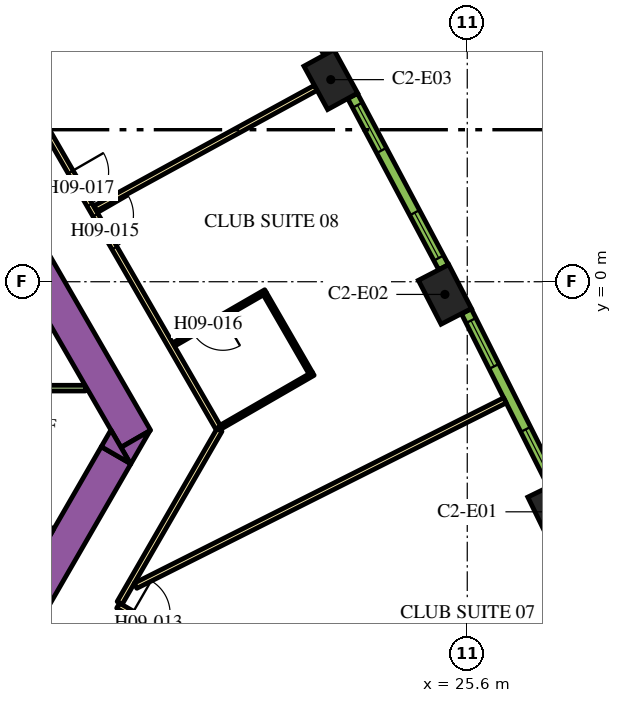
"""IFC4 building model, lengths in metres.
Left out: names, types, materials, properties, quantities, classifications, styles, units other than length and angle.
Written with IfcOpenShell. Run it as: python <this file> out.ifc"""

import sys

from ifc_helpers import new_model, si_unit, direction, frame, frame_2d, origin, origin_2d, place, context, subcontext, project, spatial, polyline, rectangle, outline, extrude, element, fill, save


model = new_model("IFC4")
c1 = context("Model", 3, precision=1e-05, world=origin(), true_north=direction((0.0, 1.0)))
c2 = subcontext(c1, "Body", "Model", "MODEL_VIEW")
j1 = project(units=[si_unit("LENGTHUNIT", "METRE"), si_unit("PLANEANGLEUNIT", "RADIAN")], contexts=[c1])
p1 = place(None, origin())
s1 = spatial("IfcSite", under=j1, at=p1, CompositionType="ELEMENT")
p2 = place(p1, origin())
s2 = spatial("IfcBuilding", under=s1, at=p2, CompositionType="ELEMENT")
p3 = place(p2, frame((0.0, 0.0, 126.6)))
s3 = spatial("IfcBuildingStorey", under=s2, at=p3, CompositionType="ELEMENT", Elevation=126.6)
for number, where, z_axis, x_axis in (
    (1, (27.883, -6.054, 0.0), (0.0, 0.0, 1.0), (-0.438, 0.899, 0.0)),
    (2, (25.012, -0.334, 0.0), (0.0, 0.0, 1.0), (-0.459, 0.888, 0.0)),
    (3, (22.009, 5.317, 0.0), (0.0, 0.0, 1.0), (-0.48, 0.877, 0.0)),
):
    element("IfcColumn", number, at=place(p3, frame(where, z_axis=z_axis, x_axis=x_axis)), inside=s3, PredefinedType="COLUMN", context=c2, shape_type="SweptSolid", body=[
        extrude(rectangle(XDim=1.3, YDim=0.9, at=origin_2d()), origin(), (0.0, 0.0, 1.0), 3.9),
    ])
p4 = place(p3, frame((6.776, 13.364, 0.0), z_axis=(0.0, 0.0, 1.0), x_axis=(0.500004177138, -0.8660229921, 0.0)))
e4 = element("IfcWall", 4, at=p4, inside=s3, PredefinedType="SOLIDWALL", context=c2, shape_type="SweptSolid", body=[
    extrude(rectangle(XDim=20.204, YDim=0.9, at=frame_2d((10.102, 0.0))), origin(), (0.0, 0.0, 1.0), 3.9),
])
p5 = place(p3, origin())
e5 = element("IfcWall", 5, at=p5, inside=s3, PredefinedType="SOLIDWALL", context=c2, shape_type="SweptSolid", body=[
    extrude(outline(polyline([(16.743, -4.8), (16.489, -4.36), (17.251, -3.92), (16.743, -4.8)])), origin(), (0.0, 0.0, 1.0), 3.9),
])
p6 = place(p3, frame((11.695, -12.644, 0.0), z_axis=(0.0, 0.0, 1.0), x_axis=(0.500010229568, 0.86601949766, 0.0)))
e6 = element("IfcWall", 6, at=p6, inside=s3, PredefinedType="SOLIDWALL", context=c2, shape_type="SweptSolid", body=[
    extrude(rectangle(XDim=9.326, YDim=0.9, at=frame_2d((4.663, 0.0))), origin(), (0.0, 0.0, 1.0), 3.9),
])
e7 = element("IfcWall", 7, at=p5, inside=s3, PredefinedType="SOLIDWALL", context=c2, shape_type="SweptSolid", body=[
    extrude(outline(polyline([(16.223, -3.9), (16.732, -4.78), (15.969, -4.34), (16.223, -3.9)])), origin(), (0.0, 0.0, 1.0), 3.9),
])
p7 = place(p3, frame((12.885, -9.431, 0.0), z_axis=(0.0, 0.0, 1.0), x_axis=(0.500020560727, 0.866013532718, 0.0)))
e8 = element("IfcWall", 8, at=p7, inside=s3, PredefinedType="SOLIDWALL", context=c2, shape_type="SweptSolid", body=[
    extrude(rectangle(XDim=3.45, YDim=0.25, at=frame_2d((1.725, 0.0))), origin(), (0.0, 0.0, 1.0), 3.9),
])
p8 = place(p3, frame((12.915, -2.8, 0.0), z_axis=(0.0, 0.0, 1.0), x_axis=(1.0, 0.0, 0.0)))
e9 = element("IfcWall", 9, at=p8, inside=s3, PredefinedType="PARTITIONING", context=c2, shape_type="SweptSolid", body=[
    extrude(rectangle(XDim=2.637, YDim=0.15, at=frame_2d((1.318, 0.0))), origin(), (0.0, 0.0, 1.0), 2.75),
])
p9 = place(p3, frame((16.412, -8.523, 0.0), z_axis=(0.0, 0.0, 1.0), x_axis=(0.866025629663, -0.499999608766, 0.0)))
e10 = element("IfcWall", 10, at=p9, inside=s3, PredefinedType="PARTITIONING", context=c2, shape_type="SweptSolid", body=[
    extrude(rectangle(XDim=13.624, YDim=0.15, at=frame_2d((6.812, 0.0))), origin(), (0.0, 0.0, 1.0), 2.75),
])
p10 = place(p9, frame((0.426, 0.0, 0.0)))
e11 = element("IfcOpeningElement", 11, at=p10, cuts=e10, PredefinedType="OPENING", context=c2, shape_type="SweptSolid", body=[
    extrude(rectangle(XDim=1.0, YDim=2.1, at=frame_2d((0.5, 1.05))), frame((0.0, 0.085, 0.0), z_axis=(0.0, -1.0, 0.0), x_axis=(1.0, 0.0, 0.0)), (0.0, 0.0, 1.0), 0.17),
])
p11 = place(p3, frame((19.081, -3.9, 0.0), z_axis=(0.0, 0.0, 1.0), x_axis=(-0.499974327079, -0.866040225545, 0.0)))
e12 = element("IfcWall", 12, at=p11, inside=s3, PredefinedType="PARTITIONING", context=c2, shape_type="SweptSolid", body=[
    extrude(rectangle(XDim=5.258, YDim=0.15, at=frame_2d((2.629, 0.0))), origin(), (0.0, 0.0, 1.0), 2.75),
])
p12 = place(p3, frame((6.163, 18.475, 0.0), z_axis=(0.0, 0.0, 1.0), x_axis=(0.500001317485, -0.866024643133, 0.0)))
e13 = element("IfcWall", 13, at=p12, inside=s3, PredefinedType="PARTITIONING", context=c2, shape_type="SweptSolid", body=[
    extrude(rectangle(XDim=25.767, YDim=0.15, at=frame_2d((12.883, 0.0))), origin(), (0.0, 0.0, 1.0), 2.75),
])
p13 = place(p12, frame((19.306, 0.0, 0.0)))
e14 = element("IfcOpeningElement", 14, at=p13, cuts=e13, PredefinedType="OPENING", context=c2, shape_type="SweptSolid", body=[
    extrude(rectangle(XDim=1.0, YDim=2.1, at=frame_2d((0.5, 1.05))), frame((0.0, 0.085, 0.0), z_axis=(0.0, -1.0, 0.0), x_axis=(1.0, 0.0, 0.0)), (0.0, 0.0, 1.0), 0.17),
])
p14 = place(p12, frame((17.999, 0.0, 0.0)))
e15 = element("IfcOpeningElement", 15, at=p14, cuts=e13, PredefinedType="OPENING", context=c2, shape_type="SweptSolid", body=[
    extrude(rectangle(XDim=1.0, YDim=2.1, at=frame_2d((0.5, 1.05))), frame((0.0, 0.085, 0.0), z_axis=(0.0, -1.0, 0.0), x_axis=(1.0, 0.0, 0.0)), (0.0, 0.0, 1.0), 0.17),
])
p15 = place(p12, frame((0.596, 0.0, 0.0)))
e16 = element("IfcOpeningElement", 16, at=p15, cuts=e13, PredefinedType="OPENING", context=c2, shape_type="SweptSolid", body=[
    extrude(rectangle(XDim=1.0, YDim=2.1, at=frame_2d((0.5, 1.05))), frame((0.0, 0.085, 0.0), z_axis=(0.0, -1.0, 0.0), x_axis=(1.0, 0.0, 0.0)), (0.0, 0.0, 1.0), 0.17),
])
p16 = place(p3, frame((21.614, 5.102, 0.0), z_axis=(0.0, 0.0, 1.0), x_axis=(-0.877484555087, -0.479604895287, 0.0)))
e17 = element("IfcWall", 17, at=p16, inside=s3, PredefinedType="PARTITIONING", context=c2, shape_type="SweptSolid", body=[
    extrude(rectangle(XDim=6.611, YDim=0.15, at=frame_2d((3.306, 0.0))), origin(), (0.0, 0.0, 1.0), 2.75),
])
p17 = place(p3, frame((26.591, -3.122, 0.0), z_axis=(0.0, 0.0, 1.0), x_axis=(-0.893766213273, -0.448533115847, 0.0)))
e18 = element("IfcWall", 18, at=p17, inside=s3, PredefinedType="PARTITIONING", context=c2, shape_type="SweptSolid", body=[
    extrude(rectangle(XDim=10.875, YDim=0.15, at=frame_2d((5.438, 0.0))), origin(), (0.0, 0.0, 1.0), 2.75),
])
p18 = place(p3, frame((20.296, -0.254, 0.0), z_axis=(0.0, 0.0, 1.0), x_axis=(-0.866034573852, -0.49998411664, 0.0)))
e19 = element("IfcWall", 19, at=p18, inside=s3, PredefinedType="PARTITIONING", context=c2, shape_type="SweptSolid", body=[
    extrude(rectangle(XDim=2.8, YDim=0.1, at=frame_2d((1.4, 0.0))), origin(), (0.0, 0.0, 1.0), 2.75),
])
p19 = place(p18, frame((1.3, 0.0, 0.0)))
e20 = element("IfcOpeningElement", 20, at=p19, cuts=e19, PredefinedType="OPENING", context=c2, shape_type="SweptSolid", body=[
    extrude(rectangle(XDim=0.9, YDim=2.1, at=frame_2d((0.45, 1.05))), frame((0.0, 0.06, 0.0), z_axis=(0.0, -1.0, 0.0), x_axis=(1.0, 0.0, 0.0)), (0.0, 0.0, 1.0), 0.12),
])
p20 = place(p3, frame((20.278, -0.323, 0.0), z_axis=(0.0, 0.0, 1.0), x_axis=(0.500001309137, -0.866024647952, 0.0)))
e21 = element("IfcWall", 21, at=p20, inside=s3, PredefinedType="PARTITIONING", context=c2, shape_type="SweptSolid", body=[
    extrude(rectangle(XDim=2.4, YDim=0.1, at=frame_2d((1.2, 0.0))), origin(), (0.0, 0.0, 1.0), 2.75),
])
p21 = place(p3, frame((19.121, -3.819, 0.0), z_axis=(0.0, 0.0, 1.0), x_axis=(0.866034573852, 0.49998411664, 0.0)))
e22 = element("IfcWall", 22, at=p21, inside=s3, PredefinedType="PARTITIONING", context=c2, shape_type="SweptSolid", body=[
    extrude(rectangle(XDim=2.8, YDim=0.1, at=frame_2d((1.4, 0.0))), origin(), (0.0, 0.0, 1.0), 2.75),
])
p22 = place(p3, frame((27.864, -5.336, 0.0), z_axis=(0.0, 0.0, 1.0), x_axis=(-0.448534297211, 0.893765620409, 0.0)))
e23 = element("IfcWall", 23, at=p22, inside=s3, PredefinedType="SOLIDWALL", context=c2, shape_type="SweptSolid", body=[
    extrude(rectangle(XDim=5.1, YDim=0.29, at=frame_2d((2.55, 0.0))), origin(), (0.0, 0.0, 1.0), 3.65),
])
p23 = place(p22, frame((0.272, 0.0, 0.9)))
e24 = element("IfcOpeningElement", 24, at=p23, cuts=e23, PredefinedType="OPENING", context=c2, shape_type="SweptSolid", body=[
    extrude(rectangle(XDim=1.35, YDim=2.15, at=frame_2d((0.675, 1.075))), frame((0.0, 0.155, 0.0), z_axis=(0.0, -1.0, 0.0), x_axis=(1.0, 0.0, 0.0)), (0.0, 0.0, 1.0), 0.31),
])
p24 = place(p22, frame((3.478, 0.0, 0.9)))
e25 = element("IfcOpeningElement", 25, at=p24, cuts=e23, PredefinedType="OPENING", context=c2, shape_type="SweptSolid", body=[
    extrude(rectangle(XDim=1.35, YDim=2.15, at=frame_2d((0.675, 1.075))), frame((0.0, 0.155, 0.0), z_axis=(0.0, -1.0, 0.0), x_axis=(1.0, 0.0, 0.0)), (0.0, 0.0, 1.0), 0.31),
])
p25 = place(p3, frame((24.977, 0.383, 0.0), z_axis=(0.0, 0.0, 1.0), x_axis=(-0.469323203119, 0.883026461106, 0.0)))
e26 = element("IfcWall", 26, at=p25, inside=s3, PredefinedType="SOLIDWALL", context=c2, shape_type="SweptSolid", body=[
    extrude(rectangle(XDim=5.101, YDim=0.29, at=frame_2d((2.55, 0.0))), origin(), (0.0, 0.0, 1.0), 3.65),
])
p26 = place(p25, frame((0.273, 0.0, 0.9)))
e27 = element("IfcOpeningElement", 27, at=p26, cuts=e26, PredefinedType="OPENING", context=c2, shape_type="SweptSolid", body=[
    extrude(rectangle(XDim=1.35, YDim=2.15, at=frame_2d((0.675, 1.075))), frame((0.0, 0.155, 0.0), z_axis=(0.0, -1.0, 0.0), x_axis=(1.0, 0.0, 0.0)), (0.0, 0.0, 1.0), 0.31),
])
p27 = place(p25, frame((3.478, 0.0, 0.9)))
e28 = element("IfcOpeningElement", 28, at=p27, cuts=e26, PredefinedType="OPENING", context=c2, shape_type="SweptSolid", body=[
    extrude(rectangle(XDim=1.35, YDim=2.15, at=frame_2d((0.675, 1.075))), frame((0.0, 0.155, 0.0), z_axis=(0.0, -1.0, 0.0), x_axis=(1.0, 0.0, 0.0)), (0.0, 0.0, 1.0), 0.31),
])
p28 = place(p3, frame((21.956, 6.033, 0.0), z_axis=(0.0, 0.0, 1.0), x_axis=(-0.48983164787, 0.87181704316, 0.0)))
e29 = element("IfcWall", 29, at=p28, inside=s3, PredefinedType="SOLIDWALL", context=c2, shape_type="SweptSolid", body=[
    extrude(rectangle(XDim=5.1, YDim=0.29, at=frame_2d((2.55, 0.0))), origin(), (0.0, 0.0, 1.0), 3.65),
])
p29 = place(p28, frame((0.273, 0.0, 0.9)))
e30 = element("IfcOpeningElement", 30, at=p29, cuts=e29, PredefinedType="OPENING", context=c2, shape_type="SweptSolid", body=[
    extrude(rectangle(XDim=1.35, YDim=2.15, at=frame_2d((0.675, 1.075))), frame((0.0, 0.155, 0.0), z_axis=(0.0, -1.0, 0.0), x_axis=(1.0, 0.0, 0.0)), (0.0, 0.0, 1.0), 0.31),
])
p30 = place(p28, frame((3.478, 0.0, 0.9)))
e31 = element("IfcOpeningElement", 31, at=p30, cuts=e29, PredefinedType="OPENING", context=c2, shape_type="SweptSolid", body=[
    extrude(rectangle(XDim=1.35, YDim=2.15, at=frame_2d((0.675, 1.075))), frame((0.0, 0.155, 0.0), z_axis=(0.0, -1.0, 0.0), x_axis=(1.0, 0.0, 0.0)), (0.0, 0.0, 1.0), 0.31),
])
p31 = place(p10, origin())
e32 = element("IfcDoor", 32, at=p31, inside=s3, OperationType="SINGLE_SWING_LEFT", PredefinedType="DOOR", context=c2, shape_type="SweptSolid", body=[
    extrude(rectangle(XDim=1.0, YDim=2.1, at=frame_2d((0.5, 1.05))), frame((0.0, 0.025, 0.0), z_axis=(0.0, -1.0, 0.0), x_axis=(1.0, 0.0, 0.0)), (0.0, 0.0, 1.0), 0.05),
])
fill(e11, e32)
p32 = place(p13, origin())
e33 = element("IfcDoor", 33, at=p32, inside=s3, OperationType="SINGLE_SWING_LEFT", PredefinedType="DOOR", context=c2, shape_type="SweptSolid", body=[
    extrude(rectangle(XDim=1.0, YDim=2.1, at=frame_2d((0.5, 1.05))), frame((0.0, 0.025, 0.0), z_axis=(0.0, -1.0, 0.0), x_axis=(1.0, 0.0, 0.0)), (0.0, 0.0, 1.0), 0.05),
])
fill(e14, e33)
p33 = place(p19, origin())
e34 = element("IfcDoor", 34, at=p33, inside=s3, OperationType="SINGLE_SWING_LEFT", PredefinedType="DOOR", context=c2, shape_type="SweptSolid", body=[
    extrude(rectangle(XDim=0.9, YDim=2.1, at=frame_2d((0.45, 1.05))), frame((0.0, 0.025, 0.0), z_axis=(0.0, -1.0, 0.0), x_axis=(1.0, 0.0, 0.0)), (0.0, 0.0, 1.0), 0.05),
])
fill(e20, e34)
p34 = place(p14, origin())
e35 = element("IfcDoor", 35, at=p34, inside=s3, OperationType="SINGLE_SWING_RIGHT", PredefinedType="DOOR", context=c2, shape_type="SweptSolid", body=[
    extrude(rectangle(XDim=1.0, YDim=2.1, at=frame_2d((0.5, 1.05))), frame((0.0, 0.025, 0.0), z_axis=(0.0, -1.0, 0.0), x_axis=(1.0, 0.0, 0.0)), (0.0, 0.0, 1.0), 0.05),
])
fill(e15, e35)
p35 = place(p23, origin())
e36 = element("IfcWindow", 36, at=p35, inside=s3, PartitioningType="DOUBLE_PANEL_VERTICAL", PredefinedType="WINDOW", context=c2, shape_type="SweptSolid", body=[
    extrude(rectangle(XDim=1.35, YDim=2.15, at=frame_2d((0.675, 1.075))), frame((0.0, 0.015, 0.0), z_axis=(0.0, -1.0, 0.0), x_axis=(1.0, 0.0, 0.0)), (0.0, 0.0, 1.0), 0.06),
])
fill(e24, e36)
p36 = place(p24, origin())
e37 = element("IfcWindow", 37, at=p36, inside=s3, PartitioningType="DOUBLE_PANEL_VERTICAL", PredefinedType="WINDOW", context=c2, shape_type="SweptSolid", body=[
    extrude(rectangle(XDim=1.35, YDim=2.15, at=frame_2d((0.675, 1.075))), frame((0.0, 0.015, 0.0), z_axis=(0.0, -1.0, 0.0), x_axis=(1.0, 0.0, 0.0)), (0.0, 0.0, 1.0), 0.06),
])
fill(e25, e37)
p37 = place(p26, origin())
e38 = element("IfcWindow", 38, at=p37, inside=s3, PartitioningType="DOUBLE_PANEL_VERTICAL", PredefinedType="WINDOW", context=c2, shape_type="SweptSolid", body=[
    extrude(rectangle(XDim=1.35, YDim=2.15, at=frame_2d((0.675, 1.075))), frame((0.0, 0.015, 0.0), z_axis=(0.0, -1.0, 0.0), x_axis=(1.0, 0.0, 0.0)), (0.0, 0.0, 1.0), 0.06),
])
fill(e27, e38)
p38 = place(p27, origin())
e39 = element("IfcWindow", 39, at=p38, inside=s3, PartitioningType="DOUBLE_PANEL_VERTICAL", PredefinedType="WINDOW", context=c2, shape_type="SweptSolid", body=[
    extrude(rectangle(XDim=1.35, YDim=2.15, at=frame_2d((0.675, 1.075))), frame((0.0, 0.015, 0.0), z_axis=(0.0, -1.0, 0.0), x_axis=(1.0, 0.0, 0.0)), (0.0, 0.0, 1.0), 0.06),
])
fill(e28, e39)
save(model, sys.argv[1])
